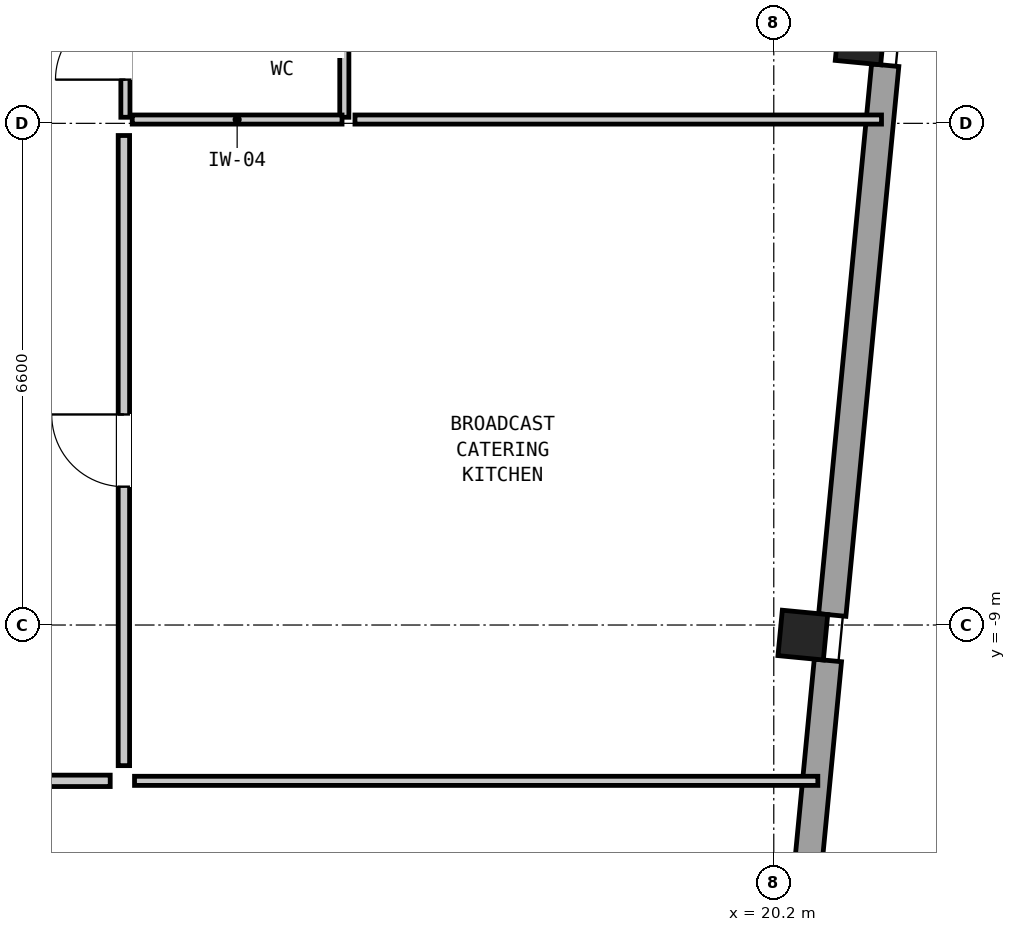
"""IFC4 building model, lengths in metres.
Left out: names, types, materials, properties, quantities, classifications, styles, units other than length and angle.
Written with IfcOpenShell. Run it as: python <this file> out.ifc"""

import sys

from ifc_helpers import new_model, si_unit, direction, frame, frame_2d, origin, origin_2d, place, context, subcontext, project, spatial, rectangle, hollow_rectangle, extrude, element, fill, save


model = new_model("IFC4")
c1 = context("Model", 3, precision=1e-05, world=origin(), true_north=direction((0.0, 1.0)))
c2 = subcontext(c1, "Body", "Model", "MODEL_VIEW")
j1 = project(units=[si_unit("LENGTHUNIT", "METRE"), si_unit("PLANEANGLEUNIT", "RADIAN")], contexts=[c1])
p1 = place(None, origin())
s1 = spatial("IfcSite", under=j1, at=p1, CompositionType="ELEMENT")
p2 = place(p1, origin())
s2 = spatial("IfcBuilding", under=s1, at=p2, CompositionType="ELEMENT")
p3 = place(p2, frame((0.0, 0.0, 267.25)))
s3 = spatial("IfcBuildingStorey", under=s2, at=p3, CompositionType="ELEMENT", Elevation=267.25)
for number, where, z_axis, x_axis in (
    (1, (20.583, -9.133, 0.0), (0.0, 0.0, 1.0), (0.096, 0.995, 0.0)),
    (2, (21.336, -1.302, 0.0), (0.0, 0.0, 1.0), (0.096, 0.995, 0.0)),
):
    element("IfcColumn", number, at=place(p3, frame(where, z_axis=z_axis, x_axis=x_axis)), inside=s3, PredefinedType="COLUMN", context=c2, shape_type="SweptSolid", body=[
        extrude(hollow_rectangle(XDim=0.6, YDim=0.6, WallThickness=0.04, at=origin_2d()), origin(), (0.0, 0.0, 1.0), 3.05),
    ])
p4 = place(p3, frame((21.666, -1.635, 0.0), z_axis=(0.0, 0.0, 1.0), x_axis=(-0.095853887303, -0.995395415043, 0.0)))
e3 = element("IfcWall", 3, at=p4, inside=s3, PredefinedType="SOLIDWALL", context=c2, shape_type="SweptSolid", body=[
    extrude(rectangle(XDim=7.267, YDim=0.36, at=frame_2d((3.633, 0.0))), origin(), (0.0, 0.0, 1.0), 0.98),
])
p5 = place(p3, frame((20.912, -9.466, 0.0), z_axis=(0.0, 0.0, 1.0), x_axis=(-0.095863240394, -0.995394514321, 0.0)))
e4 = element("IfcWall", 4, at=p5, inside=s3, PredefinedType="SOLIDWALL", context=c2, shape_type="SweptSolid", body=[
    extrude(rectangle(XDim=7.279, YDim=0.36, at=frame_2d((3.639, 0.0))), origin(), (0.0, 0.0, 1.0), 0.98),
])
p6 = place(p3, frame((11.67, -2.32, 0.0), z_axis=(0.0, 0.0, 1.0), x_axis=(0.0, 1.0, 0.0)))
e5 = element("IfcWall", 5, at=p6, inside=s3, PredefinedType="PARTITIONING", context=c2, shape_type="SweptSolid", body=[
    extrude(rectangle(XDim=1.94, YDim=0.12, at=frame_2d((0.97, 0.0))), origin(), (0.0, 0.0, 1.0), 2.86),
])
p7 = place(p6, frame((0.495, 0.0, 0.0)))
e6 = element("IfcOpeningElement", 6, at=p7, cuts=e5, PredefinedType="OPENING", context=c2, shape_type="SweptSolid", body=[
    extrude(rectangle(XDim=0.92, YDim=2.1, at=frame_2d((0.46, 1.05))), frame((0.0, 0.072, 0.0), z_axis=(0.0, -1.0, 0.0), x_axis=(1.0, 0.0, 0.0)), (0.0, 0.0, 1.0), 0.144),
])
p8 = place(p3, frame((14.55, -2.32, 0.0), z_axis=(0.0, 0.0, 1.0), x_axis=(0.0, 1.0, 0.0)))
e7 = element("IfcWall", 7, at=p8, inside=s3, PredefinedType="PARTITIONING", context=c2, shape_type="SweptSolid", body=[
    extrude(rectangle(XDim=5.93, YDim=0.12, at=frame_2d((2.965, 0.0))), origin(), (0.0, 0.0, 1.0), 2.86),
])
p9 = place(p3, frame((11.76, -2.35, 0.0), z_axis=(0.0, 0.0, 1.0), x_axis=(1.0, 0.0, 0.0)))
e8 = element("IfcWall", 8, at=p9, inside=s3, PredefinedType="PARTITIONING", context=c2, shape_type="SweptSolid", body=[
    extrude(rectangle(XDim=2.76, YDim=0.12, at=frame_2d((1.38, 0.0))), origin(), (0.0, 0.0, 1.0), 1.04),
])
p10 = place(p3, frame((11.79, -11.05, 0.0), z_axis=(0.0, 0.0, 1.0), x_axis=(1.0, 0.0, 0.0)))
e9 = element("IfcWall", 9, at=p10, inside=s3, PredefinedType="PARTITIONING", context=c2, shape_type="SweptSolid", body=[
    extrude(rectangle(XDim=8.99, YDim=0.12, at=frame_2d((4.495, 0.0))), origin(), (0.0, 0.0, 1.0), 2.86),
])
p11 = place(p3, frame((14.69, -2.35, 0.0), z_axis=(0.0, 0.0, 1.0), x_axis=(1.0, 0.0, 0.0)))
e10 = element("IfcWall", 10, at=p11, inside=s3, PredefinedType="PARTITIONING", context=c2, shape_type="SweptSolid", body=[
    extrude(rectangle(XDim=6.927, YDim=0.12, at=frame_2d((3.464, 0.0))), origin(), (0.0, 0.0, 1.0), 1.04),
])
p12 = place(p3, frame((0.18, -11.05, 0.0), z_axis=(0.0, 0.0, 1.0), x_axis=(1.0, 0.0, 0.0)))
e11 = element("IfcWall", 11, at=p12, inside=s3, PredefinedType="PARTITIONING", context=c2, shape_type="SweptSolid", body=[
    extrude(rectangle(XDim=11.29, YDim=0.15, at=frame_2d((5.645, 0.0))), origin(), (0.0, 0.0, 1.0), 2.86),
])
p13 = place(p12, frame((5.045, 0.0, 0.0)))
e12 = element("IfcOpeningElement", 12, at=p13, cuts=e11, PredefinedType="OPENING", context=c2, shape_type="SweptSolid", body=[
    extrude(rectangle(XDim=1.2, YDim=2.1, at=frame_2d((0.6, 1.05))), frame((0.0, 0.087, 0.0), z_axis=(0.0, -1.0, 0.0), x_axis=(1.0, 0.0, 0.0)), (0.0, 0.0, 1.0), 0.174),
])
p14 = place(p3, frame((11.65, -10.85, 0.0), z_axis=(0.0, 0.0, 1.0), x_axis=(0.0, 1.0, 0.0)))
e13 = element("IfcWall", 13, at=p14, inside=s3, PredefinedType="PARTITIONING", context=c2, shape_type="SweptSolid", body=[
    extrude(rectangle(XDim=8.29, YDim=0.15, at=frame_2d((4.145, 0.0))), origin(), (0.0, 0.0, 1.0), 2.86),
])
p15 = place(p14, frame((3.67, 0.0, 0.0)))
e14 = element("IfcOpeningElement", 14, at=p15, cuts=e13, PredefinedType="OPENING", context=c2, shape_type="SweptSolid", body=[
    extrude(rectangle(XDim=0.95, YDim=2.1, at=frame_2d((0.475, 1.05))), frame((0.0, 0.087, 0.0), z_axis=(0.0, -1.0, 0.0), x_axis=(1.0, 0.0, 0.0)), (0.0, 0.0, 1.0), 0.174),
])
p16 = place(p7, origin())
e15 = element("IfcDoor", 15, at=p16, inside=s3, OperationType="SINGLE_SWING_LEFT", PredefinedType="DOOR", context=c2, shape_type="SweptSolid", body=[
    extrude(rectangle(XDim=0.92, YDim=2.1, at=frame_2d((0.46, 1.05))), frame((0.0, 0.025, 0.0), z_axis=(0.0, -1.0, 0.0), x_axis=(1.0, 0.0, 0.0)), (0.0, 0.0, 1.0), 0.05),
])
fill(e6, e15)
p17 = place(p15, origin())
e16 = element("IfcDoor", 16, at=p17, inside=s3, OperationType="SINGLE_SWING_RIGHT", PredefinedType="DOOR", context=c2, shape_type="SweptSolid", body=[
    extrude(rectangle(XDim=0.95, YDim=2.1, at=frame_2d((0.475, 1.05))), frame((0.0, 0.025, 0.0), z_axis=(0.0, -1.0, 0.0), x_axis=(1.0, 0.0, 0.0)), (0.0, 0.0, 1.0), 0.05),
])
fill(e14, e16)
save(model, sys.argv[1])
